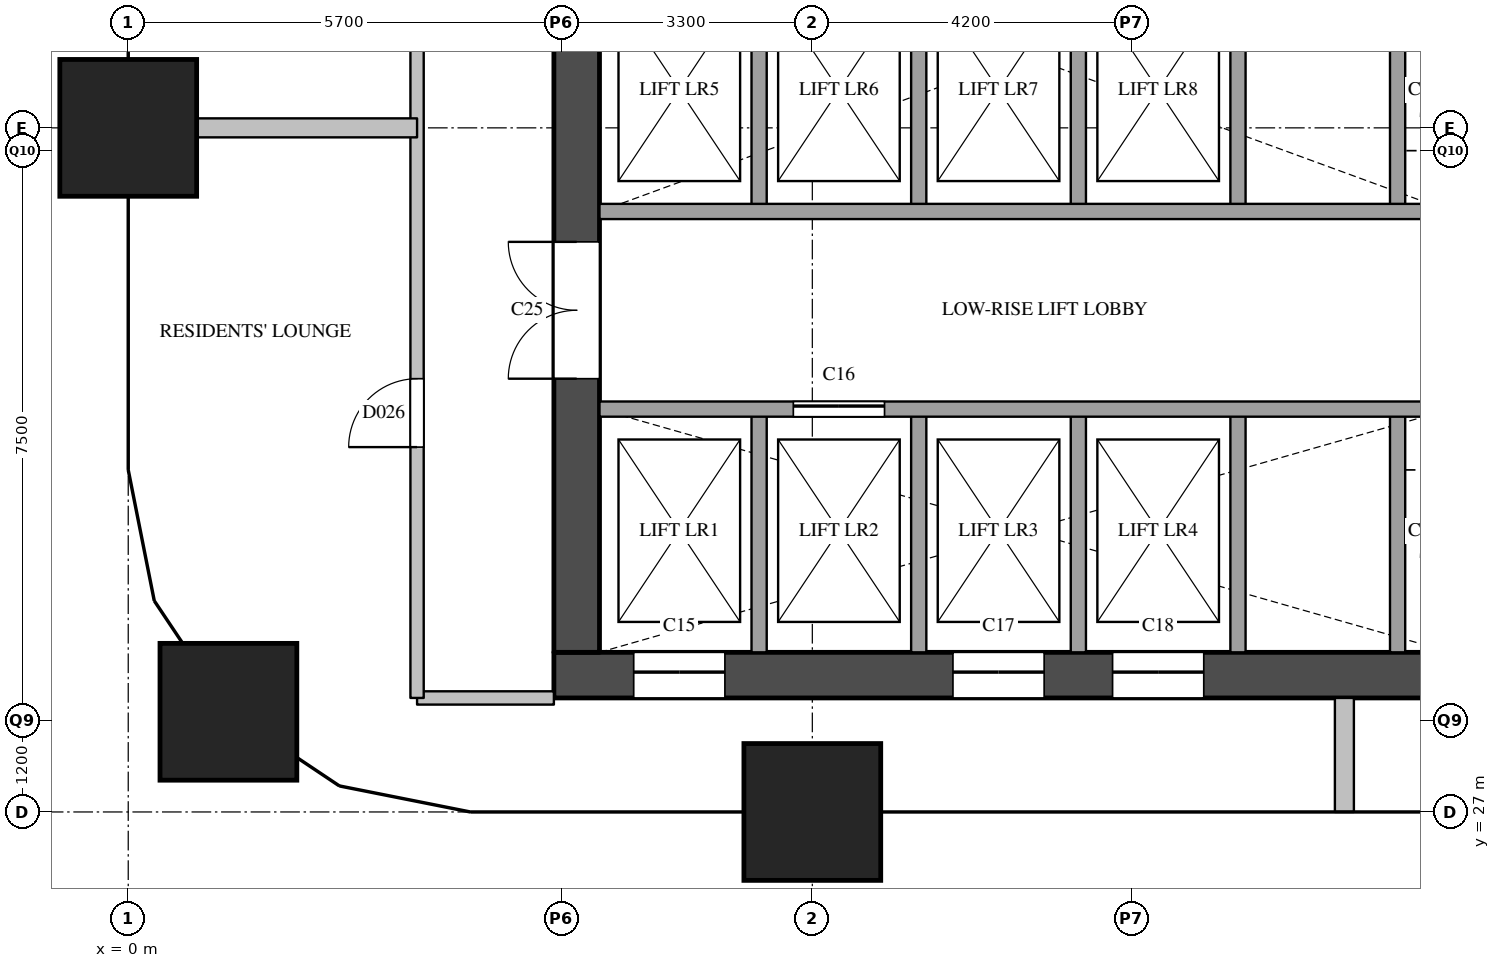
"""IFC4 building model, lengths in metres.
Left out: names, types, materials, properties, quantities, classifications, styles, units other than length and angle.
Written with IfcOpenShell. Run it as: python <this file> out.ifc"""

import sys

from ifc_helpers import new_model, si_unit, direction, frame, frame_2d, origin, origin_2d, place, context, subcontext, project, spatial, rectangle, extrude, element, fill, save


model = new_model("IFC4")
c1 = context("Model", 3, precision=1e-05, world=origin(), true_north=direction((0.0, 1.0)))
c2 = subcontext(c1, "Body", "Model", "MODEL_VIEW")
j1 = project(units=[si_unit("LENGTHUNIT", "METRE"), si_unit("PLANEANGLEUNIT", "RADIAN")], contexts=[c1])
p1 = place(None, origin())
s1 = spatial("IfcSite", under=j1, at=p1, CompositionType="ELEMENT")
p2 = place(p1, origin())
s2 = spatial("IfcBuilding", under=s1, at=p2, CompositionType="ELEMENT")
p3 = place(p2, frame((0.0, 0.0, 81.6)))
s3 = spatial("IfcBuildingStorey", under=s2, at=p3, CompositionType="ELEMENT", Elevation=81.6)
for number, where, z_axis, x_axis in (
    (1, (1.318, 28.318, 0.0), (0.0, 0.0, 1.0), (1.0, 0.0, 0.0)),
    (2, (0.0, 36.0, 0.0), (0.0, 0.0, 1.0), (1.0, 0.0, 0.0)),
    (3, (9.0, 27.0, 0.0), (0.0, 0.0, 1.0), (1.0, 0.0, 0.0)),
):
    element("IfcColumn", number, at=place(p3, frame(where, z_axis=z_axis, x_axis=x_axis)), inside=s3, PredefinedType="COLUMN", context=c2, shape_type="SweptSolid", body=[
        extrude(rectangle(XDim=1.8, YDim=1.8, at=origin_2d()), origin(), (0.0, 0.0, 1.0), 3.8),
    ])
p4 = place(p3, frame((5.6, 28.8, 0.0), z_axis=(0.0, 0.0, 1.0), x_axis=(1.0, 0.0, 0.0)))
e4 = element("IfcWall", 4, at=p4, inside=s3, PredefinedType="SHEAR", context=c2, shape_type="SweptSolid", body=[
    extrude(rectangle(XDim=12.4, YDim=0.6, at=frame_2d((6.2, 0.0))), origin(), (0.0, 0.0, 1.0), 3.5),
])
p5 = place(p4, frame((1.05, 0.0, 0.0)))
e5 = element("IfcOpeningElement", 5, at=p5, cuts=e4, PredefinedType="OPENING", context=c2, shape_type="SweptSolid", body=[
    extrude(rectangle(XDim=1.2, YDim=2.1, at=frame_2d((0.6, 1.05))), frame((0.0, 0.31, 0.0), z_axis=(0.0, -1.0, 0.0), x_axis=(1.0, 0.0, 0.0)), (0.0, 0.0, 1.0), 0.62),
])
p6 = place(p4, frame((5.25, 0.0, 0.0)))
e6 = element("IfcOpeningElement", 6, at=p6, cuts=e4, PredefinedType="OPENING", context=c2, shape_type="SweptSolid", body=[
    extrude(rectangle(XDim=1.2, YDim=2.1, at=frame_2d((0.6, 1.05))), frame((0.0, 0.31, 0.0), z_axis=(0.0, -1.0, 0.0), x_axis=(1.0, 0.0, 0.0)), (0.0, 0.0, 1.0), 0.62),
])
p7 = place(p4, frame((7.35, 0.0, 0.0)))
e7 = element("IfcOpeningElement", 7, at=p7, cuts=e4, PredefinedType="OPENING", context=c2, shape_type="SweptSolid", body=[
    extrude(rectangle(XDim=1.2, YDim=2.1, at=frame_2d((0.6, 1.05))), frame((0.0, 0.31, 0.0), z_axis=(0.0, -1.0, 0.0), x_axis=(1.0, 0.0, 0.0)), (0.0, 0.0, 1.0), 0.62),
])
p8 = place(p3, frame((5.9, 29.1, 0.0), z_axis=(0.0, 0.0, 1.0), x_axis=(0.0, 1.0, 0.0)))
e8 = element("IfcWall", 8, at=p8, inside=s3, PredefinedType="SHEAR", context=c2, shape_type="SweptSolid", body=[
    extrude(rectangle(XDim=20.3, YDim=0.6, at=frame_2d((10.15, 0.0))), origin(), (0.0, 0.0, 1.0), 3.5),
])
p9 = place(p8, frame((3.6, 0.0, 0.0)))
e9 = element("IfcOpeningElement", 9, at=p9, cuts=e8, PredefinedType="OPENING", context=c2, shape_type="SweptSolid", body=[
    extrude(rectangle(XDim=1.8, YDim=2.1, at=frame_2d((0.9, 1.05))), frame((0.0, 0.31, 0.0), z_axis=(0.0, -1.0, 0.0), x_axis=(1.0, 0.0, 0.0)), (0.0, 0.0, 1.0), 0.62),
])
p10 = place(p8, frame((16.4, 0.0, 0.0)))
e10 = element("IfcOpeningElement", 10, at=p10, cuts=e8, PredefinedType="OPENING", context=c2, shape_type="SweptSolid", body=[
    extrude(rectangle(XDim=1.0, YDim=2.1, at=frame_2d((0.5, 1.05))), frame((0.0, 0.31, 0.0), z_axis=(0.0, -1.0, 0.0), x_axis=(1.0, 0.0, 0.0)), (0.0, 0.0, 1.0), 0.62),
])
p11 = place(p3, frame((8.3, 29.1, 0.0), z_axis=(0.0, 0.0, 1.0), x_axis=(0.0, 1.0, 0.0)))
e11 = element("IfcWall", 11, at=p11, inside=s3, PredefinedType="SOLIDWALL", context=c2, shape_type="SweptSolid", body=[
    extrude(rectangle(XDim=3.2, YDim=0.2, at=frame_2d((1.6, 0.0))), origin(), (0.0, 0.0, 1.0), 3.5),
])
p12 = place(p3, frame((8.3, 34.9, 0.0), z_axis=(0.0, 0.0, 1.0), x_axis=(0.0, 1.0, 0.0)))
e12 = element("IfcWall", 12, at=p12, inside=s3, PredefinedType="SOLIDWALL", context=c2, shape_type="SweptSolid", body=[
    extrude(rectangle(XDim=3.2, YDim=0.2, at=frame_2d((1.6, 0.0))), origin(), (0.0, 0.0, 1.0), 3.5),
])
p13 = place(p3, frame((10.4, 29.1, 0.0), z_axis=(0.0, 0.0, 1.0), x_axis=(0.0, 1.0, 0.0)))
e13 = element("IfcWall", 13, at=p13, inside=s3, PredefinedType="SOLIDWALL", context=c2, shape_type="SweptSolid", body=[
    extrude(rectangle(XDim=3.2, YDim=0.2, at=frame_2d((1.6, 0.0))), origin(), (0.0, 0.0, 1.0), 3.5),
])
p14 = place(p3, frame((10.4, 34.9, 0.0), z_axis=(0.0, 0.0, 1.0), x_axis=(0.0, 1.0, 0.0)))
e14 = element("IfcWall", 14, at=p14, inside=s3, PredefinedType="SOLIDWALL", context=c2, shape_type="SweptSolid", body=[
    extrude(rectangle(XDim=3.2, YDim=0.2, at=frame_2d((1.6, 0.0))), origin(), (0.0, 0.0, 1.0), 3.5),
])
p15 = place(p3, frame((12.5, 29.1, 0.0), z_axis=(0.0, 0.0, 1.0), x_axis=(0.0, 1.0, 0.0)))
e15 = element("IfcWall", 15, at=p15, inside=s3, PredefinedType="SOLIDWALL", context=c2, shape_type="SweptSolid", body=[
    extrude(rectangle(XDim=3.2, YDim=0.2, at=frame_2d((1.6, 0.0))), origin(), (0.0, 0.0, 1.0), 3.5),
])
p16 = place(p3, frame((12.5, 34.9, 0.0), z_axis=(0.0, 0.0, 1.0), x_axis=(0.0, 1.0, 0.0)))
e16 = element("IfcWall", 16, at=p16, inside=s3, PredefinedType="SOLIDWALL", context=c2, shape_type="SweptSolid", body=[
    extrude(rectangle(XDim=3.2, YDim=0.2, at=frame_2d((1.6, 0.0))), origin(), (0.0, 0.0, 1.0), 3.5),
])
p17 = place(p3, frame((14.6, 29.1, 0.0), z_axis=(0.0, 0.0, 1.0), x_axis=(0.0, 1.0, 0.0)))
e17 = element("IfcWall", 17, at=p17, inside=s3, PredefinedType="SOLIDWALL", context=c2, shape_type="SweptSolid", body=[
    extrude(rectangle(XDim=3.2, YDim=0.2, at=frame_2d((1.6, 0.0))), origin(), (0.0, 0.0, 1.0), 3.5),
])
p18 = place(p3, frame((14.6, 34.9, 0.0), z_axis=(0.0, 0.0, 1.0), x_axis=(0.0, 1.0, 0.0)))
e18 = element("IfcWall", 18, at=p18, inside=s3, PredefinedType="SOLIDWALL", context=c2, shape_type="SweptSolid", body=[
    extrude(rectangle(XDim=3.2, YDim=0.2, at=frame_2d((1.6, 0.0))), origin(), (0.0, 0.0, 1.0), 3.5),
])
p19 = place(p3, frame((16.7, 29.1, 0.0), z_axis=(0.0, 0.0, 1.0), x_axis=(0.0, 1.0, 0.0)))
e19 = element("IfcWall", 19, at=p19, inside=s3, PredefinedType="SOLIDWALL", context=c2, shape_type="SweptSolid", body=[
    extrude(rectangle(XDim=3.2, YDim=0.2, at=frame_2d((1.6, 0.0))), origin(), (0.0, 0.0, 1.0), 3.5),
])
p20 = place(p3, frame((16.7, 34.9, 0.0), z_axis=(0.0, 0.0, 1.0), x_axis=(0.0, 1.0, 0.0)))
e20 = element("IfcWall", 20, at=p20, inside=s3, PredefinedType="SOLIDWALL", context=c2, shape_type="SweptSolid", body=[
    extrude(rectangle(XDim=3.2, YDim=0.2, at=frame_2d((1.6, 0.0))), origin(), (0.0, 0.0, 1.0), 3.5),
])
p21 = place(p3, frame((6.2, 32.3, 0.0), z_axis=(0.0, 0.0, 1.0), x_axis=(1.0, 0.0, 0.0)))
e21 = element("IfcWall", 21, at=p21, inside=s3, PredefinedType="SOLIDWALL", context=c2, shape_type="SweptSolid", body=[
    extrude(rectangle(XDim=11.2, YDim=0.2, at=frame_2d((5.6, 0.0))), origin(), (0.0, 0.0, 1.0), 3.5),
])
p22 = place(p21, frame((2.55, 0.0, 0.0)))
e22 = element("IfcOpeningElement", 22, at=p22, cuts=e21, PredefinedType="OPENING", context=c2, shape_type="SweptSolid", body=[
    extrude(rectangle(XDim=1.2, YDim=2.1, at=frame_2d((0.6, 1.05))), frame((0.0, 0.11, 0.0), z_axis=(0.0, -1.0, 0.0), x_axis=(1.0, 0.0, 0.0)), (0.0, 0.0, 1.0), 0.22),
])
p23 = place(p3, frame((6.2, 34.9, 0.0), z_axis=(0.0, 0.0, 1.0), x_axis=(1.0, 0.0, 0.0)))
e23 = element("IfcWall", 23, at=p23, inside=s3, PredefinedType="SOLIDWALL", context=c2, shape_type="SweptSolid", body=[
    extrude(rectangle(XDim=11.2, YDim=0.2, at=frame_2d((5.6, 0.0))), origin(), (0.0, 0.0, 1.0), 3.5),
])
p24 = place(p3, frame((3.8, 28.5, 0.0), z_axis=(0.0, 0.0, 1.0), x_axis=(1.0, 0.0, 0.0)))
e24 = element("IfcWall", 24, at=p24, inside=s3, PredefinedType="PARTITIONING", context=c2, shape_type="SweptSolid", body=[
    extrude(rectangle(XDim=1.8, YDim=0.175, at=frame_2d((0.9, 0.0))), origin(), (0.0, 0.0, 1.0), 3.5),
])
p25 = place(p3, frame((3.8, 28.5, 0.0), z_axis=(0.0, 0.0, 1.0), x_axis=(0.0, 1.0, 0.0)))
e25 = element("IfcWall", 25, at=p25, inside=s3, PredefinedType="PARTITIONING", context=c2, shape_type="SweptSolid", body=[
    extrude(rectangle(XDim=23.3, YDim=0.175, at=frame_2d((11.65, 0.0))), origin(), (0.0, 0.0, 1.0), 3.5),
])
p26 = place(p25, frame((3.3, 0.0, 0.0)))
e26 = element("IfcOpeningElement", 26, at=p26, cuts=e25, PredefinedType="OPENING", context=c2, shape_type="SweptSolid", body=[
    extrude(rectangle(XDim=0.9, YDim=2.1, at=frame_2d((0.45, 1.05))), frame((0.0, 0.097, 0.0), z_axis=(0.0, -1.0, 0.0), x_axis=(1.0, 0.0, 0.0)), (0.0, 0.0, 1.0), 0.195),
])
p27 = place(p25, frame((11.05, 0.0, 0.0)))
e27 = element("IfcOpeningElement", 27, at=p27, cuts=e25, PredefinedType="OPENING", context=c2, shape_type="SweptSolid", body=[
    extrude(rectangle(XDim=0.9, YDim=2.1, at=frame_2d((0.45, 1.05))), frame((0.0, 0.097, 0.0), z_axis=(0.0, -1.0, 0.0), x_axis=(1.0, 0.0, 0.0)), (0.0, 0.0, 1.0), 0.195),
])
p28 = place(p25, frame((18.95, 0.0, 0.0)))
e28 = element("IfcOpeningElement", 28, at=p28, cuts=e25, PredefinedType="OPENING", context=c2, shape_type="SweptSolid", body=[
    extrude(rectangle(XDim=0.9, YDim=2.1, at=frame_2d((0.45, 1.05))), frame((0.0, 0.097, 0.0), z_axis=(0.0, -1.0, 0.0), x_axis=(1.0, 0.0, 0.0)), (0.0, 0.0, 1.0), 0.195),
])
p29 = place(p3, frame((0.0, 36.0, 0.0), z_axis=(0.0, 0.0, 1.0), x_axis=(1.0, 0.0, 0.0)))
e29 = element("IfcWall", 29, at=p29, inside=s3, PredefinedType="PARTITIONING", context=c2, shape_type="SweptSolid", body=[
    extrude(rectangle(XDim=3.8, YDim=0.25, at=frame_2d((1.9, 0.0))), origin(), (0.0, 0.0, 1.0), 3.5),
])
p30 = place(p3, frame((16.0, 27.0, 0.0), z_axis=(0.0, 0.0, 1.0), x_axis=(0.0, 1.0, 0.0)))
e30 = element("IfcWall", 30, at=p30, inside=s3, PredefinedType="PARTITIONING", context=c2, shape_type="SweptSolid", body=[
    extrude(rectangle(XDim=1.5, YDim=0.25, at=frame_2d((0.75, 0.0))), origin(), (0.0, 0.0, 1.0), 2.5),
])
p31 = place(p5, origin())
e31 = element("IfcDoor", 31, at=p31, inside=s3, OperationType="SLIDING_TO_LEFT", PredefinedType="DOOR", context=c2, shape_type="SweptSolid", body=[
    extrude(rectangle(XDim=1.2, YDim=2.1, at=frame_2d((0.6, 1.05))), frame((0.0, 0.025, 0.0), z_axis=(0.0, -1.0, 0.0), x_axis=(1.0, 0.0, 0.0)), (0.0, 0.0, 1.0), 0.05),
])
fill(e5, e31)
p32 = place(p22, origin())
e32 = element("IfcDoor", 32, at=p32, inside=s3, OperationType="SLIDING_TO_LEFT", PredefinedType="DOOR", context=c2, shape_type="SweptSolid", body=[
    extrude(rectangle(XDim=1.2, YDim=2.1, at=frame_2d((0.6, 1.05))), frame((0.0, 0.025, 0.0), z_axis=(0.0, -1.0, 0.0), x_axis=(1.0, 0.0, 0.0)), (0.0, 0.0, 1.0), 0.05),
])
fill(e22, e32)
p33 = place(p6, origin())
e33 = element("IfcDoor", 33, at=p33, inside=s3, OperationType="SLIDING_TO_LEFT", PredefinedType="DOOR", context=c2, shape_type="SweptSolid", body=[
    extrude(rectangle(XDim=1.2, YDim=2.1, at=frame_2d((0.6, 1.05))), frame((0.0, 0.025, 0.0), z_axis=(0.0, -1.0, 0.0), x_axis=(1.0, 0.0, 0.0)), (0.0, 0.0, 1.0), 0.05),
])
fill(e6, e33)
p34 = place(p7, origin())
e34 = element("IfcDoor", 34, at=p34, inside=s3, OperationType="SLIDING_TO_LEFT", PredefinedType="DOOR", context=c2, shape_type="SweptSolid", body=[
    extrude(rectangle(XDim=1.2, YDim=2.1, at=frame_2d((0.6, 1.05))), frame((0.0, 0.025, 0.0), z_axis=(0.0, -1.0, 0.0), x_axis=(1.0, 0.0, 0.0)), (0.0, 0.0, 1.0), 0.05),
])
fill(e7, e34)
p35 = place(p9, origin())
e35 = element("IfcDoor", 35, at=p35, inside=s3, OperationType="DOUBLE_DOOR_SINGLE_SWING", PredefinedType="DOOR", context=c2, shape_type="SweptSolid", body=[
    extrude(rectangle(XDim=1.8, YDim=2.1, at=frame_2d((0.9, 1.05))), frame((0.0, 0.025, 0.0), z_axis=(0.0, -1.0, 0.0), x_axis=(1.0, 0.0, 0.0)), (0.0, 0.0, 1.0), 0.05),
])
fill(e9, e35)
p36 = place(p26, origin())
e36 = element("IfcDoor", 36, at=p36, inside=s3, OperationType="SINGLE_SWING_LEFT", PredefinedType="DOOR", context=c2, shape_type="SweptSolid", body=[
    extrude(rectangle(XDim=0.9, YDim=2.1, at=frame_2d((0.45, 1.05))), frame((0.0, 0.025, 0.0), z_axis=(0.0, -1.0, 0.0), x_axis=(1.0, 0.0, 0.0)), (0.0, 0.0, 1.0), 0.05),
])
fill(e26, e36)
save(model, sys.argv[1])
